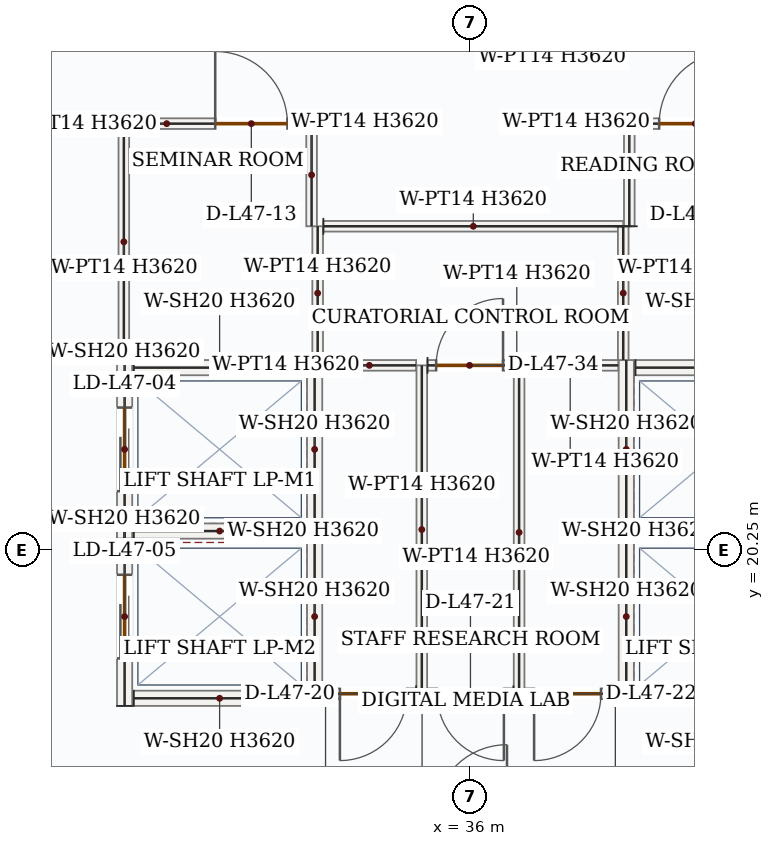
"""IFC4 building model, lengths in metres.
Left out: names, types, materials, properties, quantities, classifications, styles, units other than length and angle.
Written with IfcOpenShell. Run it as: python <this file> out.ifc"""

import sys

from ifc_helpers import new_model, si_unit, direction, frame, frame_2d, origin, place, context, subcontext, project, spatial, rectangle, extrude, source, transform, mapped, element, fill, save


model = new_model("IFC4")
c1 = context("Model", 3, precision=1e-05, world=origin(), true_north=direction((0.0, 1.0)))
c2 = subcontext(c1, "Body", "Model", "MODEL_VIEW")
j1 = project(units=[si_unit("LENGTHUNIT", "METRE"), si_unit("PLANEANGLEUNIT", "RADIAN")], contexts=[c1])
p1 = place(None, origin())
s1 = spatial("IfcSite", under=j1, at=p1, CompositionType="ELEMENT")
p2 = place(p1, origin())
s2 = spatial("IfcBuilding", under=s1, at=p2, CompositionType="ELEMENT")
p3 = place(p2, frame((0.0, 0.0, 201.9)))
s3 = spatial("IfcBuildingStorey", under=s2, at=p3, CompositionType="ELEMENT", Elevation=201.9)
p4 = place(p3, frame((31.45, 20.4, 0.0), z_axis=(0.0, 0.0, 1.0), x_axis=(0.0, 1.0, 0.0)))
e1 = element("IfcWall", 1, at=p4, inside=s3, PredefinedType="SOLIDWALL", context=c2, shape_type="SweptSolid", body=[
    extrude(rectangle(XDim=2.35, YDim=0.2, at=frame_2d((1.175, 0.0))), origin(), (0.0, 0.0, 1.0), 3.62),
])
p5 = place(p4, frame((0.625, 0.0, 0.0)))
e2 = element("IfcOpeningElement", 2, at=p5, cuts=e1, PredefinedType="OPENING", context=c2, shape_type="SweptSolid", body=[
    extrude(rectangle(XDim=1.1, YDim=2.15, at=frame_2d((0.55, 1.075))), frame((0.0, 0.11, 0.0), z_axis=(0.0, -1.0, 0.0), x_axis=(1.0, 0.0, 0.0)), (0.0, 0.0, 1.0), 0.22),
])
m1 = source(origin(), c2, "Body", "SweptSolid", [
    extrude(rectangle(XDim=2.35, YDim=0.2, at=frame_2d((1.175, 0.0))), origin(), (0.0, 0.0, 1.0), 3.62),
])
p6 = place(p3, frame((33.95, 20.4, 0.0), z_axis=(0.0, 0.0, 1.0), x_axis=(0.0, 1.0, 0.0)))
e3 = element("IfcWall", 3, at=p6, inside=s3, PredefinedType="SOLIDWALL", context=c2, shape_type="MappedRepresentation", body=[
    mapped(m1, transform((0.0, 0.0, 0.0), x_axis=(1.0, 0.0, 0.0), y_axis=(0.0, 1.0, 0.0), z_axis=(0.0, 0.0, 1.0), scale=1.0)),
])
m2 = source(origin(), c2, "Body", "SweptSolid", [
    extrude(rectangle(XDim=2.26, YDim=0.2, at=frame_2d((1.13, 0.0))), origin(), (0.0, 0.0, 1.0), 3.62),
])
for number, where, z_axis, x_axis in (
    (4, (31.57, 20.5, 0.0), (0.0, 0.0, 1.0), (1.0, 0.0, 0.0)),
    (5, (31.57, 22.65, 0.0), (0.0, 0.0, 1.0), (1.0, 0.0, 0.0)),
):
    element("IfcWall", number, at=place(p3, frame(where, z_axis=z_axis, x_axis=x_axis)), inside=s3, PredefinedType="SOLIDWALL", context=c2, shape_type="MappedRepresentation", body=[
        mapped(m2, transform((0.0, 0.0, 0.0), x_axis=(1.0, 0.0, 0.0), y_axis=(0.0, 1.0, 0.0), z_axis=(0.0, 0.0, 1.0), scale=1.0)),
    ])
p7 = place(p3, frame((31.45, 18.2, 0.0), z_axis=(0.0, 0.0, 1.0), x_axis=(0.0, 1.0, 0.0)))
e6 = element("IfcWall", 6, at=p7, inside=s3, PredefinedType="SOLIDWALL", context=c2, shape_type="SweptSolid", body=[
    extrude(rectangle(XDim=2.35, YDim=0.2, at=frame_2d((1.175, 0.0))), origin(), (0.0, 0.0, 1.0), 3.62),
])
p8 = place(p7, frame((0.625, 0.0, 0.0)))
e7 = element("IfcOpeningElement", 7, at=p8, cuts=e6, PredefinedType="OPENING", context=c2, shape_type="SweptSolid", body=[
    extrude(rectangle(XDim=1.1, YDim=2.15, at=frame_2d((0.55, 1.075))), frame((0.0, 0.11, 0.0), z_axis=(0.0, -1.0, 0.0), x_axis=(1.0, 0.0, 0.0)), (0.0, 0.0, 1.0), 0.22),
])
p9 = place(p3, frame((33.95, 18.2, 0.0), z_axis=(0.0, 0.0, 1.0), x_axis=(0.0, 1.0, 0.0)))
e8 = element("IfcWall", 8, at=p9, inside=s3, PredefinedType="SOLIDWALL", context=c2, shape_type="MappedRepresentation", body=[
    mapped(m1, transform((0.0, 0.0, 0.0), x_axis=(1.0, 0.0, 0.0), y_axis=(0.0, 1.0, 0.0), z_axis=(0.0, 0.0, 1.0), scale=1.0)),
])
p10 = place(p3, frame((31.57, 18.3, 0.0), z_axis=(0.0, 0.0, 1.0), x_axis=(1.0, 0.0, 0.0)))
e9 = element("IfcWall", 9, at=p10, inside=s3, PredefinedType="SOLIDWALL", context=c2, shape_type="MappedRepresentation", body=[
    mapped(m2, transform((0.0, 0.0, 0.0), x_axis=(1.0, 0.0, 0.0), y_axis=(0.0, 1.0, 0.0), z_axis=(0.0, 0.0, 1.0), scale=1.0)),
])
p11 = place(p3, frame((38.05, 20.4, 0.0), z_axis=(0.0, 0.0, 1.0), x_axis=(0.0, 1.0, 0.0)))
e10 = element("IfcWall", 10, at=p11, inside=s3, PredefinedType="SOLIDWALL", context=c2, shape_type="MappedRepresentation", body=[
    mapped(m1, transform((0.0, 0.0, 0.0), x_axis=(1.0, 0.0, 0.0), y_axis=(0.0, 1.0, 0.0), z_axis=(0.0, 0.0, 1.0), scale=1.0)),
])
for number, where, z_axis, x_axis in (
    (11, (38.17, 20.5, 0.0), (0.0, 0.0, 1.0), (1.0, 0.0, 0.0)),
    (12, (38.17, 22.65, 0.0), (0.0, 0.0, 1.0), (1.0, 0.0, 0.0)),
):
    element("IfcWall", number, at=place(p3, frame(where, z_axis=z_axis, x_axis=x_axis)), inside=s3, PredefinedType="SOLIDWALL", context=c2, shape_type="MappedRepresentation", body=[
        mapped(m2, transform((0.0, 0.0, 0.0), x_axis=(1.0, 0.0, 0.0), y_axis=(0.0, 1.0, 0.0), z_axis=(0.0, 0.0, 1.0), scale=1.0)),
    ])
p12 = place(p3, frame((38.05, 18.2, 0.0), z_axis=(0.0, 0.0, 1.0), x_axis=(0.0, 1.0, 0.0)))
e13 = element("IfcWall", 13, at=p12, inside=s3, PredefinedType="SOLIDWALL", context=c2, shape_type="MappedRepresentation", body=[
    mapped(m1, transform((0.0, 0.0, 0.0), x_axis=(1.0, 0.0, 0.0), y_axis=(0.0, 1.0, 0.0), z_axis=(0.0, 0.0, 1.0), scale=1.0)),
])
p13 = place(p3, frame((38.17, 18.3, 0.0), z_axis=(0.0, 0.0, 1.0), x_axis=(1.0, 0.0, 0.0)))
e14 = element("IfcWall", 14, at=p13, inside=s3, PredefinedType="SOLIDWALL", context=c2, shape_type="MappedRepresentation", body=[
    mapped(m2, transform((0.0, 0.0, 0.0), x_axis=(1.0, 0.0, 0.0), y_axis=(0.0, 1.0, 0.0), z_axis=(0.0, 0.0, 1.0), scale=1.0)),
])
m3 = source(origin(), c2, "Body", "SweptSolid", [
    extrude(rectangle(XDim=4.32, YDim=0.14, at=frame_2d((2.16, 0.0))), origin(), (0.0, 0.0, 1.0), 3.62),
])
p14 = place(p3, frame((35.36, 18.36, 0.0), z_axis=(0.0, 0.0, 1.0), x_axis=(0.0, 1.0, 0.0)))
e15 = element("IfcWall", 15, at=p14, inside=s3, PredefinedType="PARTITIONING", context=c2, shape_type="MappedRepresentation", body=[
    mapped(m3, transform((0.0, 0.0, 0.0), x_axis=(1.0, 0.0, 0.0), y_axis=(0.0, 1.0, 0.0), z_axis=(0.0, 0.0, 1.0), scale=1.0)),
])
p15 = place(p3, frame((35.435, 22.68, 0.0), z_axis=(0.0, 0.0, 1.0), x_axis=(1.0, 0.0, 0.0)))
e16 = element("IfcWall", 16, at=p15, inside=s3, PredefinedType="PARTITIONING", context=c2, shape_type="SweptSolid", body=[
    extrude(rectangle(XDim=1.205, YDim=0.14, at=frame_2d((0.603, 0.0))), origin(), (0.0, 0.0, 1.0), 3.62),
])
p16 = place(p15, frame((0.114, 0.0, 0.0)))
e17 = element("IfcOpeningElement", 17, at=p16, cuts=e16, PredefinedType="OPENING", context=c2, shape_type="SweptSolid", body=[
    extrude(rectangle(XDim=0.88, YDim=2.1, at=frame_2d((0.44, 1.05))), frame((0.0, 0.08, 0.0), z_axis=(0.0, -1.0, 0.0), x_axis=(1.0, 0.0, 0.0)), (0.0, 0.0, 1.0), 0.16),
])
m4 = source(origin(), c2, "Body", "SweptSolid", [
    extrude(rectangle(XDim=4.245, YDim=0.14, at=frame_2d((2.123, 0.0))), origin(), (0.0, 0.0, 1.0), 3.62),
])
p17 = place(p3, frame((36.64, 22.605, 0.0), z_axis=(0.0, 0.0, 1.0), x_axis=(0.0, -1.0, 0.0)))
e18 = element("IfcWall", 18, at=p17, inside=s3, PredefinedType="PARTITIONING", context=c2, shape_type="MappedRepresentation", body=[
    mapped(m4, transform((0.0, 0.0, 0.0), x_axis=(1.0, 0.0, 0.0), y_axis=(0.0, 1.0, 0.0), z_axis=(0.0, 0.0, 1.0), scale=1.0)),
])
p18 = place(p3, frame((36.565, 18.36, 0.0), z_axis=(0.0, 0.0, 1.0), x_axis=(-1.0, 0.0, 0.0)))
e19 = element("IfcWall", 19, at=p18, inside=s3, PredefinedType="PARTITIONING", context=c2, shape_type="SweptSolid", body=[
    extrude(rectangle(XDim=1.13, YDim=0.14, at=frame_2d((0.565, 0.0))), origin(), (0.0, 0.0, 1.0), 3.62),
])
p19 = place(p18, frame((0.125, 0.0, 0.0)))
e20 = element("IfcOpeningElement", 20, at=p19, cuts=e19, PredefinedType="OPENING", context=c2, shape_type="SweptSolid", body=[
    extrude(rectangle(XDim=0.88, YDim=2.1, at=frame_2d((0.44, 1.05))), frame((0.0, 0.08, 0.0), z_axis=(0.0, -1.0, 0.0), x_axis=(1.0, 0.0, 0.0)), (0.0, 0.0, 1.0), 0.16),
])
m5 = source(origin(), c2, "Body", "SweptSolid", [
    extrude(rectangle(XDim=1.23, YDim=0.14, at=frame_2d((0.615, 0.0))), origin(), (0.0, 0.0, 1.0), 3.62),
])
p20 = place(p3, frame((34.055, 22.68, 0.0), z_axis=(0.0, 0.0, 1.0), x_axis=(1.0, 0.0, 0.0)))
e21 = element("IfcWall", 21, at=p20, inside=s3, PredefinedType="PARTITIONING", context=c2, shape_type="MappedRepresentation", body=[
    mapped(m5, transform((0.0, 0.0, 0.0), x_axis=(1.0, 0.0, 0.0), y_axis=(0.0, 1.0, 0.0), z_axis=(0.0, 0.0, 1.0), scale=1.0)),
])
p21 = place(p3, frame((35.285, 18.36, 0.0), z_axis=(0.0, 0.0, 1.0), x_axis=(-1.0, 0.0, 0.0)))
e22 = element("IfcWall", 22, at=p21, inside=s3, PredefinedType="PARTITIONING", context=c2, shape_type="SweptSolid", body=[
    extrude(rectangle(XDim=1.23, YDim=0.14, at=frame_2d((0.615, 0.0))), origin(), (0.0, 0.0, 1.0), 3.62),
])
p22 = place(p21, frame((0.123, 0.0, 0.0)))
e23 = element("IfcOpeningElement", 23, at=p22, cuts=e22, PredefinedType="OPENING", context=c2, shape_type="SweptSolid", body=[
    extrude(rectangle(XDim=0.88, YDim=2.1, at=frame_2d((0.44, 1.05))), frame((0.0, 0.08, 0.0), z_axis=(0.0, -1.0, 0.0), x_axis=(1.0, 0.0, 0.0)), (0.0, 0.0, 1.0), 0.16),
])
m6 = source(origin(), c2, "Body", "SweptSolid", [
    extrude(rectangle(XDim=1.265, YDim=0.14, at=frame_2d((0.633, 0.0))), origin(), (0.0, 0.0, 1.0), 3.62),
])
p23 = place(p3, frame((36.68, 22.68, 0.0), z_axis=(0.0, 0.0, 1.0), x_axis=(1.0, 0.0, 0.0)))
e24 = element("IfcWall", 24, at=p23, inside=s3, PredefinedType="PARTITIONING", context=c2, shape_type="MappedRepresentation", body=[
    mapped(m6, transform((0.0, 0.0, 0.0), x_axis=(1.0, 0.0, 0.0), y_axis=(0.0, 1.0, 0.0), z_axis=(0.0, 0.0, 1.0), scale=1.0)),
])
p24 = place(p3, frame((37.945, 18.36, 0.0), z_axis=(0.0, 0.0, 1.0), x_axis=(-1.0, 0.0, 0.0)))
e25 = element("IfcWall", 25, at=p24, inside=s3, PredefinedType="PARTITIONING", context=c2, shape_type="SweptSolid", body=[
    extrude(rectangle(XDim=1.23, YDim=0.14, at=frame_2d((0.615, 0.0))), origin(), (0.0, 0.0, 1.0), 3.62),
])
p25 = place(p24, frame((0.228, 0.0, 0.0)))
e26 = element("IfcOpeningElement", 26, at=p25, cuts=e25, PredefinedType="OPENING", context=c2, shape_type="SweptSolid", body=[
    extrude(rectangle(XDim=0.88, YDim=2.1, at=frame_2d((0.44, 1.05))), frame((0.0, 0.08, 0.0), z_axis=(0.0, -1.0, 0.0), x_axis=(1.0, 0.0, 0.0)), (0.0, 0.0, 1.0), 0.16),
])
m7 = source(origin(), c2, "Body", "SweptSolid", [
    extrude(rectangle(XDim=1.76, YDim=0.14, at=frame_2d((0.88, 0.0))), origin(), (0.0, 0.0, 1.0), 3.62),
])
p26 = place(p3, frame((33.99, 22.75, 0.0), z_axis=(0.0, 0.0, 1.0), x_axis=(0.0, 1.0, 0.0)))
e27 = element("IfcWall", 27, at=p26, inside=s3, PredefinedType="PARTITIONING", context=c2, shape_type="MappedRepresentation", body=[
    mapped(m7, transform((0.0, 0.0, 0.0), x_axis=(1.0, 0.0, 0.0), y_axis=(0.0, 1.0, 0.0), z_axis=(0.0, 0.0, 1.0), scale=1.0)),
])
m8 = source(origin(), c2, "Body", "SweptSolid", [
    extrude(rectangle(XDim=3.945, YDim=0.14, at=frame_2d((1.973, 0.0))), origin(), (0.0, 0.0, 1.0), 3.62),
])
p27 = place(p3, frame((34.065, 24.51, 0.0), z_axis=(0.0, 0.0, 1.0), x_axis=(1.0, 0.0, 0.0)))
e28 = element("IfcWall", 28, at=p27, inside=s3, PredefinedType="PARTITIONING", context=c2, shape_type="MappedRepresentation", body=[
    mapped(m8, transform((0.0, 0.0, 0.0), x_axis=(1.0, 0.0, 0.0), y_axis=(0.0, 1.0, 0.0), z_axis=(0.0, 0.0, 1.0), scale=1.0)),
])
p28 = place(p3, frame((38.01, 24.51, 0.0), z_axis=(0.0, 0.0, 1.0), x_axis=(0.0, -1.0, 0.0)))
e29 = element("IfcWall", 29, at=p28, inside=s3, PredefinedType="PARTITIONING", context=c2, shape_type="MappedRepresentation", body=[
    mapped(m7, transform((0.0, 0.0, 0.0), x_axis=(1.0, 0.0, 0.0), y_axis=(0.0, 1.0, 0.0), z_axis=(0.0, 0.0, 1.0), scale=1.0)),
])
m9 = source(origin(), c2, "Body", "SweptSolid", [
    extrude(rectangle(XDim=3.11, YDim=0.14, at=frame_2d((1.555, 0.0))), origin(), (0.0, 0.0, 1.0), 3.62),
])
p29 = place(p3, frame((31.44, 22.75, 0.0), z_axis=(0.0, 0.0, 1.0), x_axis=(0.0, 1.0, 0.0)))
e30 = element("IfcWall", 30, at=p29, inside=s3, PredefinedType="PARTITIONING", context=c2, shape_type="MappedRepresentation", body=[
    mapped(m9, transform((0.0, 0.0, 0.0), x_axis=(1.0, 0.0, 0.0), y_axis=(0.0, 1.0, 0.0), z_axis=(0.0, 0.0, 1.0), scale=1.0)),
])
p30 = place(p3, frame((31.515, 25.86, 0.0), z_axis=(0.0, 0.0, 1.0), x_axis=(1.0, 0.0, 0.0)))
e31 = element("IfcWall", 31, at=p30, inside=s3, PredefinedType="PARTITIONING", context=c2, shape_type="SweptSolid", body=[
    extrude(rectangle(XDim=2.395, YDim=0.14, at=frame_2d((1.198, 0.0))), origin(), (0.0, 0.0, 1.0), 3.62),
])
p31 = place(p30, frame((1.127, 0.0, 0.0)))
e32 = element("IfcOpeningElement", 32, at=p31, cuts=e31, PredefinedType="OPENING", context=c2, shape_type="SweptSolid", body=[
    extrude(rectangle(XDim=0.95, YDim=2.15, at=frame_2d((0.475, 1.075))), frame((0.0, 0.08, 0.0), z_axis=(0.0, -1.0, 0.0), x_axis=(1.0, 0.0, 0.0)), (0.0, 0.0, 1.0), 0.16),
])
m10 = source(origin(), c2, "Body", "SweptSolid", [
    extrude(rectangle(XDim=1.35, YDim=0.14, at=frame_2d((0.675, 0.0))), origin(), (0.0, 0.0, 1.0), 3.62),
])
for number, where, z_axis, x_axis in (
    (33, (33.91, 25.86, 0.0), (0.0, 0.0, 1.0), (0.0, -1.0, 0.0)),
    (34, (38.09, 24.51, 0.0), (0.0, 0.0, 1.0), (0.0, 1.0, 0.0)),
):
    element("IfcWall", number, at=place(p3, frame(where, z_axis=z_axis, x_axis=x_axis)), inside=s3, PredefinedType="PARTITIONING", context=c2, shape_type="MappedRepresentation", body=[
        mapped(m10, transform((0.0, 0.0, 0.0), x_axis=(1.0, 0.0, 0.0), y_axis=(0.0, 1.0, 0.0), z_axis=(0.0, 0.0, 1.0), scale=1.0)),
    ])
p32 = place(p3, frame((38.165, 25.86, 0.0), z_axis=(0.0, 0.0, 1.0), x_axis=(1.0, 0.0, 0.0)))
e35 = element("IfcWall", 35, at=p32, inside=s3, PredefinedType="PARTITIONING", context=c2, shape_type="SweptSolid", body=[
    extrude(rectangle(XDim=2.395, YDim=0.14, at=frame_2d((1.198, 0.0))), origin(), (0.0, 0.0, 1.0), 3.62),
])
p33 = place(p32, frame((0.318, 0.0, 0.0)))
e36 = element("IfcOpeningElement", 36, at=p33, cuts=e35, PredefinedType="OPENING", context=c2, shape_type="SweptSolid", body=[
    extrude(rectangle(XDim=0.95, YDim=2.15, at=frame_2d((0.475, 1.075))), frame((0.0, 0.08, 0.0), z_axis=(0.0, -1.0, 0.0), x_axis=(1.0, 0.0, 0.0)), (0.0, 0.0, 1.0), 0.16),
])
m11 = source(origin(), c2, "Body", "SweptSolid", [
    extrude(rectangle(XDim=1.1, YDim=2.15, at=frame_2d((0.55, 1.075))), frame((0.0, 0.025, 0.0), z_axis=(0.0, -1.0, 0.0), x_axis=(1.0, 0.0, 0.0)), (0.0, 0.0, 1.0), 0.05),
])
p34 = place(p5, origin())
e37 = element("IfcDoor", 37, at=p34, inside=s3, OperationType="DOUBLE_DOOR_SLIDING", PredefinedType="DOOR", context=c2, shape_type="MappedRepresentation", body=[
    mapped(m11, transform((0.0, 0.0, 0.0), x_axis=(1.0, 0.0, 0.0), y_axis=(0.0, 1.0, 0.0), z_axis=(0.0, 0.0, 1.0), scale=1.0)),
])
fill(e2, e37)
p35 = place(p8, origin())
e38 = element("IfcDoor", 38, at=p35, inside=s3, OperationType="DOUBLE_DOOR_SLIDING", PredefinedType="DOOR", context=c2, shape_type="MappedRepresentation", body=[
    mapped(m11, transform((0.0, 0.0, 0.0), x_axis=(1.0, 0.0, 0.0), y_axis=(0.0, 1.0, 0.0), z_axis=(0.0, 0.0, 1.0), scale=1.0)),
])
fill(e7, e38)
m12 = source(origin(), c2, "Body", "SweptSolid", [
    extrude(rectangle(XDim=0.95, YDim=2.15, at=frame_2d((0.475, 1.075))), frame((0.0, 0.025, 0.0), z_axis=(0.0, -1.0, 0.0), x_axis=(1.0, 0.0, 0.0)), (0.0, 0.0, 1.0), 0.05),
])
p36 = place(p31, origin())
e39 = element("IfcDoor", 39, at=p36, inside=s3, OperationType="SINGLE_SWING_LEFT", PredefinedType="DOOR", context=c2, shape_type="MappedRepresentation", body=[
    mapped(m12, transform((0.0, 0.0, 0.0), x_axis=(1.0, 0.0, 0.0), y_axis=(0.0, 1.0, 0.0), z_axis=(0.0, 0.0, 1.0), scale=1.0)),
])
fill(e32, e39)
p37 = place(p33, origin())
e40 = element("IfcDoor", 40, at=p37, inside=s3, OperationType="SINGLE_SWING_RIGHT", PredefinedType="DOOR", context=c2, shape_type="MappedRepresentation", body=[
    mapped(m12, transform((0.0, 0.0, 0.0), x_axis=(1.0, 0.0, 0.0), y_axis=(0.0, 1.0, 0.0), z_axis=(0.0, 0.0, 1.0), scale=1.0)),
])
fill(e36, e40)
m13 = source(origin(), c2, "Body", "SweptSolid", [
    extrude(rectangle(XDim=0.88, YDim=2.1, at=frame_2d((0.44, 1.05))), frame((0.0, 0.025, 0.0), z_axis=(0.0, -1.0, 0.0), x_axis=(1.0, 0.0, 0.0)), (0.0, 0.0, 1.0), 0.05),
])
p38 = place(p22, origin())
e41 = element("IfcDoor", 41, at=p38, inside=s3, OperationType="SINGLE_SWING_RIGHT", PredefinedType="DOOR", context=c2, shape_type="MappedRepresentation", body=[
    mapped(m13, transform((0.0, 0.0, 0.0), x_axis=(1.0, 0.0, 0.0), y_axis=(0.0, 1.0, 0.0), z_axis=(0.0, 0.0, 1.0), scale=1.0)),
])
fill(e23, e41)
p39 = place(p19, origin())
e42 = element("IfcDoor", 42, at=p39, inside=s3, OperationType="SINGLE_SWING_LEFT", PredefinedType="DOOR", context=c2, shape_type="MappedRepresentation", body=[
    mapped(m13, transform((0.0, 0.0, 0.0), x_axis=(1.0, 0.0, 0.0), y_axis=(0.0, 1.0, 0.0), z_axis=(0.0, 0.0, 1.0), scale=1.0)),
])
fill(e20, e42)
p40 = place(p25, origin())
e43 = element("IfcDoor", 43, at=p40, inside=s3, OperationType="SINGLE_SWING_RIGHT", PredefinedType="DOOR", context=c2, shape_type="MappedRepresentation", body=[
    mapped(m13, transform((0.0, 0.0, 0.0), x_axis=(1.0, 0.0, 0.0), y_axis=(0.0, 1.0, 0.0), z_axis=(0.0, 0.0, 1.0), scale=1.0)),
])
fill(e26, e43)
p41 = place(p16, origin())
e44 = element("IfcDoor", 44, at=p41, inside=s3, OperationType="SINGLE_SWING_RIGHT", PredefinedType="DOOR", context=c2, shape_type="MappedRepresentation", body=[
    mapped(m13, transform((0.0, 0.0, 0.0), x_axis=(1.0, 0.0, 0.0), y_axis=(0.0, 1.0, 0.0), z_axis=(0.0, 0.0, 1.0), scale=1.0)),
])
fill(e17, e44)
save(model, sys.argv[1])
